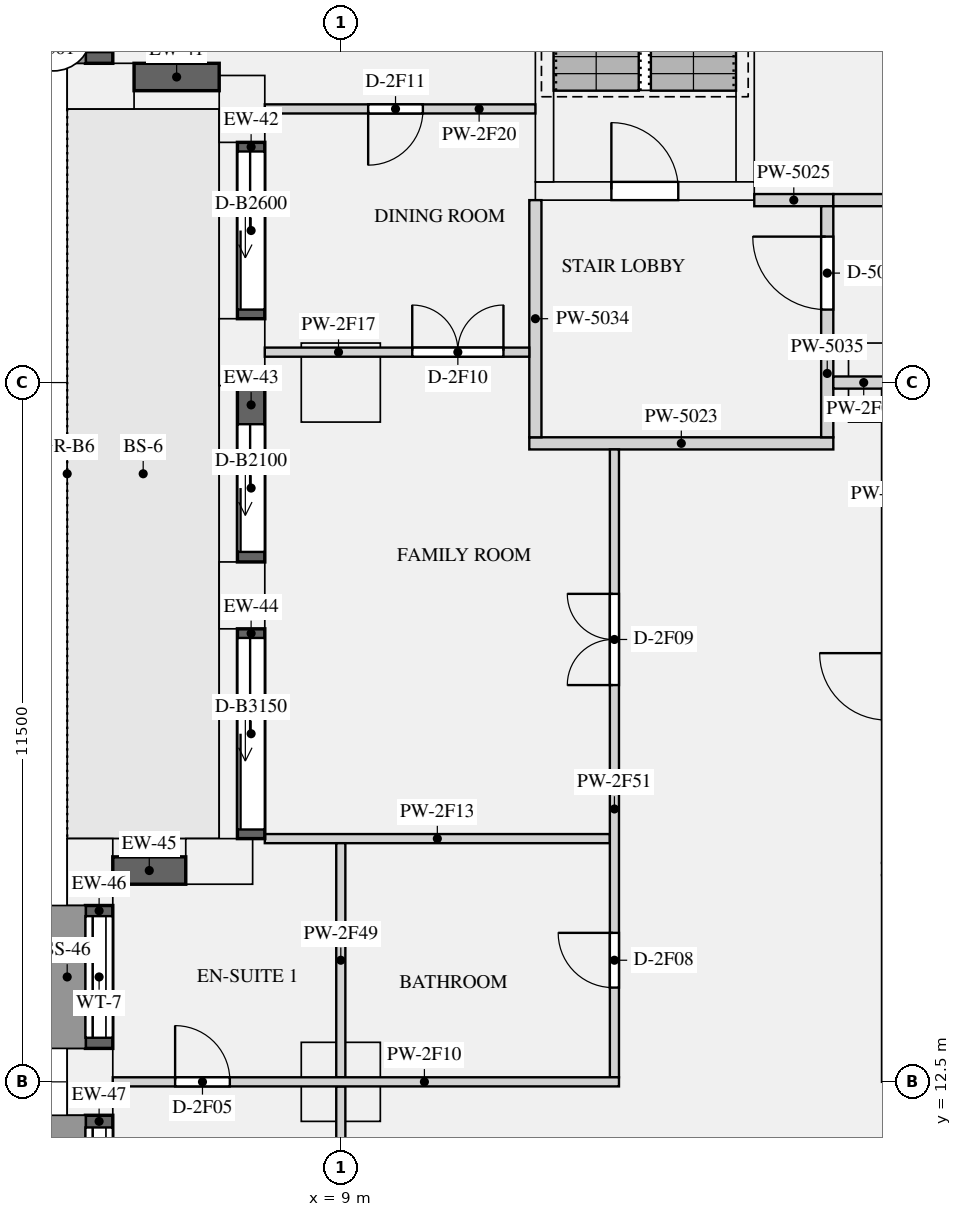
"""IFC4 building model, lengths in metres.
Left out: names, types, materials, properties, quantities, classifications, styles, units other than length and angle.
Written with IfcOpenShell. Run it as: python <this file> out.ifc"""

import sys

from ifc_helpers import new_model, si_unit, direction, frame, frame_2d, origin, origin_2d, place, context, subcontext, project, spatial, rectangle, extrude, element, fill, save


model = new_model("IFC4")
c1 = context("Model", 3, precision=1e-05, world=origin(), true_north=direction((0.0, 1.0)))
c2 = subcontext(c1, "Body", "Model", "MODEL_VIEW")
j1 = project(units=[si_unit("LENGTHUNIT", "METRE"), si_unit("PLANEANGLEUNIT", "RADIAN")], contexts=[c1])
p1 = place(None, origin())
s1 = spatial("IfcSite", under=j1, at=p1, CompositionType="ELEMENT")
p2 = place(p1, origin())
s2 = spatial("IfcBuilding", under=s1, at=p2, CompositionType="ELEMENT")
p3 = place(p2, frame((0.0, 0.0, 127.65)))
s3 = spatial("IfcBuildingStorey", under=s2, at=p3, CompositionType="ELEMENT", Elevation=127.65)
for number, where, z_axis, x_axis in (
    (1, (5.05, 28.875, 0.0), (0.0, 0.0, 1.0), (1.0, 0.0, 0.0)),
    (2, (7.375, 28.5, 0.0), (0.0, 0.0, 1.0), (0.0, -1.0, 0.0)),
    (3, (7.375, 24.5, 0.0), (0.0, 0.0, 1.0), (0.0, -1.0, 0.0)),
    (4, (7.375, 20.5, 0.0), (0.0, 0.0, 1.0), (0.0, -1.0, 0.0)),
    (5, (7.0, 16.125, 0.0), (0.0, 0.0, 1.0), (-1.0, 0.0, 0.0)),
    (6, (4.875, 15.95, 0.0), (0.0, 0.0, 1.0), (0.0, -1.0, 0.0)),
    (7, (4.875, 12.5, 0.0), (0.0, 0.0, 1.0), (0.0, -1.0, 0.0)),
):
    element("IfcColumn", number, at=place(p3, frame(where, z_axis=z_axis, x_axis=x_axis)), inside=s3, PredefinedType="USERDEFINED", context=c2, shape_type="SweptSolid", body=[
        extrude(rectangle(XDim=1.1, YDim=0.75, at=origin_2d()), origin(), (0.0, 0.0, 1.0), 3.15),
    ])
for number, where, z_axis, x_axis in (
    (8, (9.0, 24.0, 0.0), (0.0, 0.0, 1.0), (1.0, 0.0, 0.0)),
    (9, (18.0, 24.0, 0.0), (0.0, 0.0, 1.0), (1.0, 0.0, 0.0)),
    (10, (9.0, 12.5, 0.0), (0.0, 0.0, 1.0), (1.0, 0.0, 0.0)),
):
    element("IfcColumn", number, at=place(p3, frame(where, z_axis=z_axis, x_axis=x_axis)), inside=s3, PredefinedType="COLUMN", context=c2, shape_type="SweptSolid", body=[
        extrude(rectangle(XDim=1.3, YDim=1.3, at=origin_2d()), origin(), (0.0, 0.0, 1.0), 3.15),
    ])
p4 = place(p3, frame((12.2, 27.15, 0.0), z_axis=(0.0, 0.0, 1.0), x_axis=(1.0, 0.0, 0.0)))
e11 = element("IfcWall", 11, at=p4, inside=s3, PredefinedType="SHEAR", context=c2, shape_type="SweptSolid", body=[
    extrude(rectangle(XDim=3.6, YDim=0.3, at=frame_2d((1.8, 0.0))), origin(), (0.0, 0.0, 1.0), 3.15),
])
p5 = place(p4, frame((1.25, 0.0, 0.0)))
e12 = element("IfcOpeningElement", 12, at=p5, cuts=e11, PredefinedType="OPENING", context=c2, shape_type="SweptSolid", body=[
    extrude(rectangle(XDim=1.1, YDim=2.1, at=frame_2d((0.55, 1.05))), frame((0.0, 0.16, 0.0), z_axis=(0.0, -1.0, 0.0), x_axis=(1.0, 0.0, 0.0)), (0.0, 0.0, 1.0), 0.32),
])
for number, where, z_axis, x_axis in (
    (13, (12.35, 27.3, 0.0), (0.0, 0.0, 1.0), (0.0, 1.0, 0.0)),
    (14, (15.65, 27.3, 0.0), (0.0, 0.0, 1.0), (0.0, 1.0, 0.0)),
):
    element("IfcWall", number, at=place(p3, frame(where, z_axis=z_axis, x_axis=x_axis)), inside=s3, PredefinedType="SHEAR", context=c2, shape_type="SweptSolid", body=[
        extrude(rectangle(XDim=7.8, YDim=0.3, at=frame_2d((3.9, 0.0))), origin(), (0.0, 0.0, 1.0), 3.15),
    ])
p6 = place(p3, frame((5.025, 32.117, 0.9), z_axis=(0.0, 0.0, 1.0), x_axis=(0.0, -1.0, 0.0)))
e15 = element("IfcWall", 15, at=p6, inside=s3, PredefinedType="SOLIDWALL", context=c2, shape_type="SweptSolid", body=[
    extrude(rectangle(XDim=2.867, YDim=0.45, at=frame_2d((1.434, 0.0))), origin(), (0.0, 0.0, 1.0), 1.75),
])
p7 = place(p6, frame((0.184, 0.0, 0.15)))
e16 = element("IfcOpeningElement", 16, at=p7, cuts=e15, PredefinedType="OPENING", context=c2, shape_type="SweptSolid", body=[
    extrude(rectangle(XDim=2.5, YDim=1.5, at=frame_2d((1.25, 0.75))), frame((0.0, 0.235, 0.0), z_axis=(0.0, -1.0, 0.0), x_axis=(1.0, 0.0, 0.0)), (0.0, 0.0, 1.0), 0.47),
])
p8 = place(p3, frame((5.6, 29.025, 0.9), z_axis=(0.0, 0.0, 1.0), x_axis=(1.0, 0.0, 0.0)))
e17 = element("IfcWall", 17, at=p8, inside=s3, PredefinedType="SOLIDWALL", context=c2, shape_type="SweptSolid", body=[
    extrude(rectangle(XDim=1.4, YDim=0.45, at=frame_2d((0.7, 0.0))), origin(), (0.0, 0.0, 1.0), 1.75),
])
p9 = place(p3, frame((7.525, 27.95, 0.0), z_axis=(0.0, 0.0, 1.0), x_axis=(0.0, -1.0, 0.0)))
e18 = element("IfcWall", 18, at=p9, inside=s3, PredefinedType="SOLIDWALL", context=c2, shape_type="SweptSolid", body=[
    extrude(rectangle(XDim=2.9, YDim=0.45, at=frame_2d((1.45, 0.0))), origin(), (0.0, 0.0, 1.0), 2.65),
])
p10 = place(p9, frame((0.15, 0.0, 0.0)))
e19 = element("IfcOpeningElement", 19, at=p10, cuts=e18, PredefinedType="OPENING", context=c2, shape_type="SweptSolid", body=[
    extrude(rectangle(XDim=2.6, YDim=2.3, at=frame_2d((1.3, 1.15))), frame((0.0, 0.235, 0.0), z_axis=(0.0, -1.0, 0.0), x_axis=(1.0, 0.0, 0.0)), (0.0, 0.0, 1.0), 0.47),
])
p11 = place(p3, frame((7.525, 23.95, 0.0), z_axis=(0.0, 0.0, 1.0), x_axis=(0.0, -1.0, 0.0)))
e20 = element("IfcWall", 20, at=p11, inside=s3, PredefinedType="SOLIDWALL", context=c2, shape_type="SweptSolid", body=[
    extrude(rectangle(XDim=2.9, YDim=0.45, at=frame_2d((1.45, 0.0))), origin(), (0.0, 0.0, 1.0), 2.65),
])
p12 = place(p11, frame((0.635, 0.0, 0.0)))
e21 = element("IfcOpeningElement", 21, at=p12, cuts=e20, PredefinedType="OPENING", context=c2, shape_type="SweptSolid", body=[
    extrude(rectangle(XDim=2.1, YDim=2.3, at=frame_2d((1.05, 1.15))), frame((0.0, 0.235, 0.0), z_axis=(0.0, -1.0, 0.0), x_axis=(1.0, 0.0, 0.0)), (0.0, 0.0, 1.0), 0.47),
])
p13 = place(p3, frame((7.525, 19.95, 0.0), z_axis=(0.0, 0.0, 1.0), x_axis=(0.0, -1.0, 0.0)))
e22 = element("IfcWall", 22, at=p13, inside=s3, PredefinedType="SOLIDWALL", context=c2, shape_type="SweptSolid", body=[
    extrude(rectangle(XDim=3.45, YDim=0.45, at=frame_2d((1.725, 0.0))), origin(), (0.0, 0.0, 1.0), 2.65),
])
p14 = place(p13, frame((0.15, 0.0, 0.0)))
e23 = element("IfcOpeningElement", 23, at=p14, cuts=e22, PredefinedType="OPENING", context=c2, shape_type="SweptSolid", body=[
    extrude(rectangle(XDim=3.15, YDim=2.3, at=frame_2d((1.575, 1.15))), frame((0.0, 0.235, 0.0), z_axis=(0.0, -1.0, 0.0), x_axis=(1.0, 0.0, 0.0)), (0.0, 0.0, 1.0), 0.47),
])
p15 = place(p3, frame((6.45, 15.975, 0.9), z_axis=(0.0, 0.0, 1.0), x_axis=(-1.0, 0.0, 0.0)))
e24 = element("IfcWall", 24, at=p15, inside=s3, PredefinedType="SOLIDWALL", context=c2, shape_type="SweptSolid", body=[
    extrude(rectangle(XDim=1.2, YDim=0.45, at=frame_2d((0.6, 0.0))), origin(), (0.0, 0.0, 1.0), 1.75),
])
p16 = place(p3, frame((5.025, 15.4, 0.9), z_axis=(0.0, 0.0, 1.0), x_axis=(0.0, -1.0, 0.0)))
e25 = element("IfcWall", 25, at=p16, inside=s3, PredefinedType="SOLIDWALL", context=c2, shape_type="SweptSolid", body=[
    extrude(rectangle(XDim=2.35, YDim=0.45, at=frame_2d((1.175, 0.0))), origin(), (0.0, 0.0, 1.0), 1.75),
])
p17 = place(p16, frame((0.175, 0.0, 0.15)))
e26 = element("IfcOpeningElement", 26, at=p17, cuts=e25, PredefinedType="OPENING", context=c2, shape_type="SweptSolid", body=[
    extrude(rectangle(XDim=2.0, YDim=1.5, at=frame_2d((1.0, 0.75))), frame((0.0, 0.235, 0.0), z_axis=(0.0, -1.0, 0.0), x_axis=(1.0, 0.0, 0.0)), (0.0, 0.0, 1.0), 0.47),
])
p18 = place(p3, frame((5.025, 11.95, 0.9), z_axis=(0.0, 0.0, 1.0), x_axis=(0.0, -1.0, 0.0)))
e27 = element("IfcWall", 27, at=p18, inside=s3, PredefinedType="SOLIDWALL", context=c2, shape_type="SweptSolid", body=[
    extrude(rectangle(XDim=2.9, YDim=0.45, at=frame_2d((1.45, 0.0))), origin(), (0.0, 0.0, 1.0), 1.75),
])
p19 = place(p18, frame((0.2, 0.0, 0.15)))
e28 = element("IfcOpeningElement", 28, at=p19, cuts=e27, PredefinedType="OPENING", context=c2, shape_type="SweptSolid", body=[
    extrude(rectangle(XDim=2.5, YDim=1.5, at=frame_2d((1.25, 0.75))), frame((0.0, 0.235, 0.0), z_axis=(0.0, -1.0, 0.0), x_axis=(1.0, 0.0, 0.0)), (0.0, 0.0, 1.0), 0.47),
])
p20 = place(p3, frame((12.1, 23.0, 0.0), z_axis=(0.0, 0.0, 1.0), x_axis=(1.0, 0.0, 0.0)))
e29 = element("IfcWall", 29, at=p20, inside=s3, PredefinedType="PARTITIONING", context=c2, shape_type="SweptSolid", body=[
    extrude(rectangle(XDim=5.0, YDim=0.2, at=frame_2d((2.5, 0.0))), origin(), (0.0, 0.0, 1.0), 2.65),
])
p21 = place(p3, frame((15.8, 27.0, 0.0), z_axis=(0.0, 0.0, 1.0), x_axis=(1.0, 0.0, 0.0)))
e30 = element("IfcWall", 30, at=p21, inside=s3, PredefinedType="PARTITIONING", context=c2, shape_type="SweptSolid", body=[
    extrude(rectangle(XDim=1.3, YDim=0.2, at=frame_2d((0.65, 0.0))), origin(), (0.0, 0.0, 1.0), 2.65),
])
p22 = place(p3, frame((12.2, 23.1, 0.0), z_axis=(0.0, 0.0, 1.0), x_axis=(0.0, 1.0, 0.0)))
e31 = element("IfcWall", 31, at=p22, inside=s3, PredefinedType="PARTITIONING", context=c2, shape_type="SweptSolid", body=[
    extrude(rectangle(XDim=3.9, YDim=0.2, at=frame_2d((1.95, 0.0))), origin(), (0.0, 0.0, 1.0), 2.65),
])
p23 = place(p3, frame((17.0, 23.1, 0.0), z_axis=(0.0, 0.0, 1.0), x_axis=(0.0, 1.0, 0.0)))
e32 = element("IfcWall", 32, at=p23, inside=s3, PredefinedType="PARTITIONING", context=c2, shape_type="SweptSolid", body=[
    extrude(rectangle(XDim=3.8, YDim=0.2, at=frame_2d((1.9, 0.0))), origin(), (0.0, 0.0, 1.0), 2.65),
])
p24 = place(p23, frame((2.1, 0.0, 0.0)))
e33 = element("IfcOpeningElement", 33, at=p24, cuts=e32, PredefinedType="OPENING", context=c2, shape_type="SweptSolid", body=[
    extrude(rectangle(XDim=1.2, YDim=2.1, at=frame_2d((0.6, 1.05))), frame((0.0, 0.11, 0.0), z_axis=(0.0, -1.0, 0.0), x_axis=(1.0, 0.0, 0.0)), (0.0, 0.0, 1.0), 0.22),
])
p25 = place(p3, frame((17.1, 24.0, 0.0), z_axis=(0.0, 0.0, 1.0), x_axis=(1.0, 0.0, 0.0)))
e34 = element("IfcWall", 34, at=p25, inside=s3, PredefinedType="PARTITIONING", context=c2, shape_type="SweptSolid", body=[
    extrude(rectangle(XDim=1.0, YDim=0.2, at=frame_2d((0.5, 0.0))), origin(), (0.0, 0.0, 1.0), 2.65),
])
p26 = place(p3, frame((17.1, 27.0, 0.0), z_axis=(0.0, 0.0, 1.0), x_axis=(1.0, 0.0, 0.0)))
e35 = element("IfcWall", 35, at=p26, inside=s3, PredefinedType="PARTITIONING", context=c2, shape_type="SweptSolid", body=[
    extrude(rectangle(XDim=7.0, YDim=0.2, at=frame_2d((3.5, 0.0))), origin(), (0.0, 0.0, 1.0), 2.65),
])
p27 = place(p3, frame((5.25, 12.5, 0.0), z_axis=(0.0, 0.0, 1.0), x_axis=(1.0, 0.0, 0.0)))
e36 = element("IfcWall", 36, at=p27, inside=s3, PredefinedType="PARTITIONING", context=c2, shape_type="SweptSolid", body=[
    extrude(rectangle(XDim=8.325, YDim=0.15, at=frame_2d((4.163, 0.0))), origin(), (0.0, 0.0, 1.0), 2.65),
])
p28 = place(p27, frame((1.025, 0.0, 0.0)))
e37 = element("IfcOpeningElement", 37, at=p28, cuts=e36, PredefinedType="OPENING", context=c2, shape_type="SweptSolid", body=[
    extrude(rectangle(XDim=0.9, YDim=2.1, at=frame_2d((0.45, 1.05))), frame((0.0, 0.085, 0.0), z_axis=(0.0, -1.0, 0.0), x_axis=(1.0, 0.0, 0.0)), (0.0, 0.0, 1.0), 0.17),
])
p29 = place(p3, frame((7.75, 16.5, 0.0), z_axis=(0.0, 0.0, 1.0), x_axis=(1.0, 0.0, 0.0)))
e38 = element("IfcWall", 38, at=p29, inside=s3, PredefinedType="PARTITIONING", context=c2, shape_type="SweptSolid", body=[
    extrude(rectangle(XDim=5.675, YDim=0.15, at=frame_2d((2.837, 0.0))), origin(), (0.0, 0.0, 1.0), 2.65),
])
p30 = place(p3, frame((7.75, 24.5, 0.0), z_axis=(0.0, 0.0, 1.0), x_axis=(1.0, 0.0, 0.0)))
e39 = element("IfcWall", 39, at=p30, inside=s3, PredefinedType="PARTITIONING", context=c2, shape_type="SweptSolid", body=[
    extrude(rectangle(XDim=4.35, YDim=0.15, at=frame_2d((2.175, 0.0))), origin(), (0.0, 0.0, 1.0), 2.65),
])
p31 = place(p30, frame((2.425, 0.0, 0.0)))
e40 = element("IfcOpeningElement", 40, at=p31, cuts=e39, PredefinedType="OPENING", context=c2, shape_type="SweptSolid", body=[
    extrude(rectangle(XDim=1.5, YDim=2.1, at=frame_2d((0.75, 1.05))), frame((0.0, 0.085, 0.0), z_axis=(0.0, -1.0, 0.0), x_axis=(1.0, 0.0, 0.0)), (0.0, 0.0, 1.0), 0.17),
])
p32 = place(p3, frame((7.75, 28.5, 0.0), z_axis=(0.0, 0.0, 1.0), x_axis=(1.0, 0.0, 0.0)))
e41 = element("IfcWall", 41, at=p32, inside=s3, PredefinedType="PARTITIONING", context=c2, shape_type="SweptSolid", body=[
    extrude(rectangle(XDim=4.45, YDim=0.15, at=frame_2d((2.225, 0.0))), origin(), (0.0, 0.0, 1.0), 2.65),
])
p33 = place(p32, frame((1.7, 0.0, 0.0)))
e42 = element("IfcOpeningElement", 42, at=p33, cuts=e41, PredefinedType="OPENING", context=c2, shape_type="SweptSolid", body=[
    extrude(rectangle(XDim=0.9, YDim=2.1, at=frame_2d((0.45, 1.05))), frame((0.0, 0.085, 0.0), z_axis=(0.0, -1.0, 0.0), x_axis=(1.0, 0.0, 0.0)), (0.0, 0.0, 1.0), 0.17),
])
p34 = place(p3, frame((9.0, 5.25, 0.0), z_axis=(0.0, 0.0, 1.0), x_axis=(0.0, 1.0, 0.0)))
e43 = element("IfcWall", 43, at=p34, inside=s3, PredefinedType="PARTITIONING", context=c2, shape_type="SweptSolid", body=[
    extrude(rectangle(XDim=7.175, YDim=0.15, at=frame_2d((3.587, 0.0))), origin(), (0.0, 0.0, 1.0), 2.65),
])
p35 = place(p34, frame((4.475, 0.0, 0.0)))
e44 = element("IfcOpeningElement", 44, at=p35, cuts=e43, PredefinedType="OPENING", context=c2, shape_type="SweptSolid", body=[
    extrude(rectangle(XDim=0.9, YDim=2.1, at=frame_2d((0.45, 1.05))), frame((0.0, 0.085, 0.0), z_axis=(0.0, -1.0, 0.0), x_axis=(1.0, 0.0, 0.0)), (0.0, 0.0, 1.0), 0.17),
])
p36 = place(p3, frame((9.0, 12.575, 0.0), z_axis=(0.0, 0.0, 1.0), x_axis=(0.0, 1.0, 0.0)))
e45 = element("IfcWall", 45, at=p36, inside=s3, PredefinedType="PARTITIONING", context=c2, shape_type="SweptSolid", body=[
    extrude(rectangle(XDim=3.85, YDim=0.15, at=frame_2d((1.925, 0.0))), origin(), (0.0, 0.0, 1.0), 2.65),
])
p37 = place(p3, frame((13.5, 12.575, 0.0), z_axis=(0.0, 0.0, 1.0), x_axis=(0.0, 1.0, 0.0)))
e46 = element("IfcWall", 46, at=p37, inside=s3, PredefinedType="PARTITIONING", context=c2, shape_type="SweptSolid", body=[
    extrude(rectangle(XDim=10.325, YDim=0.15, at=frame_2d((5.163, 0.0))), origin(), (0.0, 0.0, 1.0), 2.65),
])
p38 = place(p37, frame((1.475, 0.0, 0.0)))
e47 = element("IfcOpeningElement", 47, at=p38, cuts=e46, PredefinedType="OPENING", context=c2, shape_type="SweptSolid", body=[
    extrude(rectangle(XDim=0.9, YDim=2.1, at=frame_2d((0.45, 1.05))), frame((0.0, 0.085, 0.0), z_axis=(0.0, -1.0, 0.0), x_axis=(1.0, 0.0, 0.0)), (0.0, 0.0, 1.0), 0.17),
])
p39 = place(p37, frame((6.45, 0.0, 0.0)))
e48 = element("IfcOpeningElement", 48, at=p39, cuts=e46, PredefinedType="OPENING", context=c2, shape_type="SweptSolid", body=[
    extrude(rectangle(XDim=1.5, YDim=2.1, at=frame_2d((0.75, 1.05))), frame((0.0, 0.085, 0.0), z_axis=(0.0, -1.0, 0.0), x_axis=(1.0, 0.0, 0.0)), (0.0, 0.0, 1.0), 0.17),
])
p40 = place(p10, origin())
e49 = element("IfcDoor", 49, at=p40, inside=s3, OperationType="SLIDING_TO_LEFT", PredefinedType="DOOR", context=c2, shape_type="SweptSolid", body=[
    extrude(rectangle(XDim=2.6, YDim=2.3, at=frame_2d((1.3, 1.15))), frame((0.0, -0.07, 0.0), z_axis=(0.0, -1.0, 0.0), x_axis=(1.0, 0.0, 0.0)), (0.0, 0.0, 1.0), 0.05),
])
fill(e19, e49)
p41 = place(p12, origin())
e50 = element("IfcDoor", 50, at=p41, inside=s3, OperationType="SLIDING_TO_LEFT", PredefinedType="DOOR", context=c2, shape_type="SweptSolid", body=[
    extrude(rectangle(XDim=2.1, YDim=2.3, at=frame_2d((1.05, 1.15))), frame((0.0, -0.07, 0.0), z_axis=(0.0, -1.0, 0.0), x_axis=(1.0, 0.0, 0.0)), (0.0, 0.0, 1.0), 0.05),
])
fill(e21, e50)
p42 = place(p14, origin())
e51 = element("IfcDoor", 51, at=p42, inside=s3, OperationType="SLIDING_TO_LEFT", PredefinedType="DOOR", context=c2, shape_type="SweptSolid", body=[
    extrude(rectangle(XDim=3.15, YDim=2.3, at=frame_2d((1.575, 1.15))), frame((0.0, -0.07, 0.0), z_axis=(0.0, -1.0, 0.0), x_axis=(1.0, 0.0, 0.0)), (0.0, 0.0, 1.0), 0.05),
])
fill(e23, e51)
p43 = place(p17, origin())
e52 = element("IfcWindow", 52, at=p43, inside=s3, PartitioningType="SINGLE_PANEL", PredefinedType="WINDOW", context=c2, shape_type="SweptSolid", body=[
    extrude(rectangle(XDim=2.0, YDim=1.5, at=frame_2d((1.0, 0.75))), frame((0.0, -0.065, 0.0), z_axis=(0.0, -1.0, 0.0), x_axis=(1.0, 0.0, 0.0)), (0.0, 0.0, 1.0), 0.06),
])
fill(e26, e52)
p44 = place(p19, origin())
e53 = element("IfcWindow", 53, at=p44, inside=s3, PartitioningType="SINGLE_PANEL", PredefinedType="WINDOW", context=c2, shape_type="SweptSolid", body=[
    extrude(rectangle(XDim=2.5, YDim=1.5, at=frame_2d((1.25, 0.75))), frame((0.0, -0.065, 0.0), z_axis=(0.0, -1.0, 0.0), x_axis=(1.0, 0.0, 0.0)), (0.0, 0.0, 1.0), 0.06),
])
fill(e28, e53)
p45 = place(p5, origin())
e54 = element("IfcDoor", 54, at=p45, inside=s3, OperationType="SINGLE_SWING_LEFT", PredefinedType="DOOR", context=c2, shape_type="SweptSolid", body=[
    extrude(rectangle(XDim=1.1, YDim=2.1, at=frame_2d((0.55, 1.05))), frame((0.0, 0.025, 0.0), z_axis=(0.0, -1.0, 0.0), x_axis=(1.0, 0.0, 0.0)), (0.0, 0.0, 1.0), 0.05),
])
fill(e12, e54)
p46 = place(p24, origin())
e55 = element("IfcDoor", 55, at=p46, inside=s3, OperationType="SINGLE_SWING_RIGHT", PredefinedType="DOOR", context=c2, shape_type="SweptSolid", body=[
    extrude(rectangle(XDim=1.2, YDim=2.1, at=frame_2d((0.6, 1.05))), frame((0.0, 0.025, 0.0), z_axis=(0.0, -1.0, 0.0), x_axis=(1.0, 0.0, 0.0)), (0.0, 0.0, 1.0), 0.05),
])
fill(e33, e55)
p47 = place(p28, origin())
e56 = element("IfcDoor", 56, at=p47, inside=s3, OperationType="SINGLE_SWING_LEFT", PredefinedType="DOOR", context=c2, shape_type="SweptSolid", body=[
    extrude(rectangle(XDim=0.9, YDim=2.1, at=frame_2d((0.45, 1.05))), frame((0.0, 0.025, 0.0), z_axis=(0.0, -1.0, 0.0), x_axis=(1.0, 0.0, 0.0)), (0.0, 0.0, 1.0), 0.05),
])
fill(e37, e56)
p48 = place(p38, origin())
e57 = element("IfcDoor", 57, at=p48, inside=s3, OperationType="SINGLE_SWING_RIGHT", PredefinedType="DOOR", context=c2, shape_type="SweptSolid", body=[
    extrude(rectangle(XDim=0.9, YDim=2.1, at=frame_2d((0.45, 1.05))), frame((0.0, 0.025, 0.0), z_axis=(0.0, -1.0, 0.0), x_axis=(1.0, 0.0, 0.0)), (0.0, 0.0, 1.0), 0.05),
])
fill(e47, e57)
p49 = place(p39, origin())
e58 = element("IfcDoor", 58, at=p49, inside=s3, OperationType="DOUBLE_DOOR_SINGLE_SWING", PredefinedType="DOOR", context=c2, shape_type="SweptSolid", body=[
    extrude(rectangle(XDim=1.5, YDim=2.1, at=frame_2d((0.75, 1.05))), frame((0.0, 0.025, 0.0), z_axis=(0.0, -1.0, 0.0), x_axis=(1.0, 0.0, 0.0)), (0.0, 0.0, 1.0), 0.05),
])
fill(e48, e58)
p50 = place(p31, origin())
e59 = element("IfcDoor", 59, at=p50, inside=s3, OperationType="DOUBLE_DOOR_SINGLE_SWING", PredefinedType="DOOR", context=c2, shape_type="SweptSolid", body=[
    extrude(rectangle(XDim=1.5, YDim=2.1, at=frame_2d((0.75, 1.05))), frame((0.0, 0.025, 0.0), z_axis=(0.0, -1.0, 0.0), x_axis=(1.0, 0.0, 0.0)), (0.0, 0.0, 1.0), 0.05),
])
fill(e40, e59)
p51 = place(p33, frame((0.9, 0.0, 0.0), z_axis=(0.0, 0.0, 1.0), x_axis=(-1.0, 0.0, 0.0)))
e60 = element("IfcDoor", 60, at=p51, inside=s3, OperationType="SINGLE_SWING_RIGHT", PredefinedType="DOOR", context=c2, shape_type="SweptSolid", body=[
    extrude(rectangle(XDim=0.9, YDim=2.1, at=frame_2d((0.45, 1.05))), frame((0.0, 0.025, 0.0), z_axis=(0.0, -1.0, 0.0), x_axis=(1.0, 0.0, 0.0)), (0.0, 0.0, 1.0), 0.05),
])
fill(e42, e60)
save(model, sys.argv[1])
